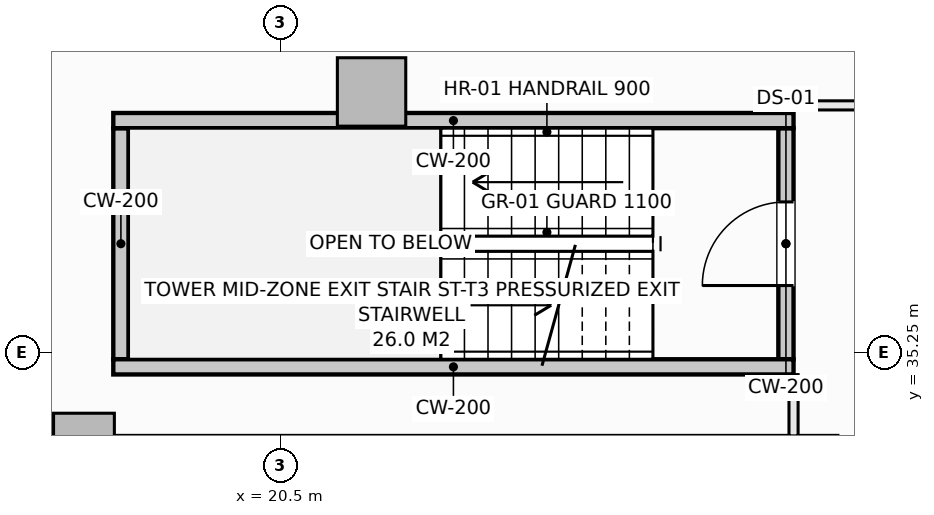
"""IFC4 building model, lengths in metres.
Left out: names, types, materials, properties, quantities, classifications, styles, units other than length and angle.
Written with IfcOpenShell. Run it as: python <this file> out.ifc"""

import sys

from ifc_helpers import new_model, si_unit, direction, frame, frame_2d, origin, origin_2d, place, context, subcontext, project, spatial, rectangle, extrude, element, fill, save


model = new_model("IFC4")
c1 = context("Model", 3, precision=1e-05, world=origin(), true_north=direction((0.0, 1.0)))
c2 = subcontext(c1, "Body", "Model", "MODEL_VIEW")
j1 = project(units=[si_unit("LENGTHUNIT", "METRE"), si_unit("PLANEANGLEUNIT", "RADIAN")], contexts=[c1])
p1 = place(None, origin())
s1 = spatial("IfcSite", under=j1, at=p1, CompositionType="ELEMENT")
p2 = place(p1, origin())
s2 = spatial("IfcBuilding", under=s1, at=p2, CompositionType="ELEMENT")
p3 = place(p2, frame((0.0, 0.0, 105.3)))
s3 = spatial("IfcBuildingStorey", under=s2, at=p3, CompositionType="ELEMENT", Elevation=105.3)
p4 = place(p3, frame((21.698, 38.677, -0.27), z_axis=(0.0, 0.0, 1.0), x_axis=(1.0, 0.0, 0.0)))
e1 = element("IfcColumn", 1, at=p4, inside=s3, PredefinedType="COLUMN", context=c2, shape_type="SweptSolid", body=[
    extrude(rectangle(XDim=0.9, YDim=0.9, at=origin_2d()), origin(), (0.0, 0.0, 1.0), 3.4),
])
p5 = place(p3, frame((17.914, 34.05, -0.27), z_axis=(0.0, 0.0, 1.0), x_axis=(1.0, 0.0, 0.0)))
e2 = element("IfcColumn", 2, at=p5, inside=s3, PredefinedType="PILASTER", context=c2, shape_type="SweptSolid", body=[
    extrude(rectangle(XDim=0.8, YDim=0.8, at=origin_2d()), origin(), (0.0, 0.0, 1.0), 3.4),
])
p6 = place(p3, frame((14.481, 39.223, 0.0), z_axis=(0.0, 0.0, 1.0), x_axis=(0.616435134162, 0.787405693001, 0.0)))
e3 = element("IfcWall", 3, at=p6, inside=s3, PredefinedType="SOLIDWALL", context=c2, shape_type="SweptSolid", body=[
    extrude(rectangle(XDim=5.759, YDim=0.3, at=frame_2d((2.879, 0.0))), origin(), (0.0, 0.0, 1.0), 2.653),
])
p7 = place(p6, frame((1.829, 0.0, 0.74)))
e4 = element("IfcOpeningElement", 4, at=p7, cuts=e3, PredefinedType="OPENING", context=c2, shape_type="SweptSolid", body=[
    extrude(rectangle(XDim=2.1, YDim=1.7, at=frame_2d((1.05, 0.85))), frame((0.0, 0.16, 0.0), z_axis=(0.0, -1.0, 0.0), x_axis=(1.0, 0.0, 0.0)), (0.0, 0.0, 1.0), 0.32),
])
p8 = place(p3, frame((27.15, 35.16, -0.27), z_axis=(0.0, 0.0, 1.0), x_axis=(0.0, 1.0, 0.0)))
e5 = element("IfcWall", 5, at=p8, inside=s3, PredefinedType="SHEAR", context=c2, shape_type="SweptSolid", body=[
    extrude(rectangle(XDim=3.04, YDim=0.2, at=frame_2d((1.52, 0.0))), origin(), (0.0, 0.0, 1.0), 3.4),
])
p9 = place(p8, frame((0.97, 0.0, 0.27)))
e6 = element("IfcOpeningElement", 6, at=p9, cuts=e5, PredefinedType="OPENING", context=c2, shape_type="SweptSolid", body=[
    extrude(rectangle(XDim=1.1, YDim=2.15, at=frame_2d((0.55, 1.075))), frame((0.0, 0.11, 0.0), z_axis=(0.0, -1.0, 0.0), x_axis=(1.0, 0.0, 0.0)), (0.0, 0.0, 1.0), 0.22),
])
p10 = place(p3, frame((18.4, 35.16, -0.27), z_axis=(0.0, 0.0, 1.0), x_axis=(0.0, 1.0, 0.0)))
e7 = element("IfcWall", 7, at=p10, inside=s3, PredefinedType="SHEAR", context=c2, shape_type="SweptSolid", body=[
    extrude(rectangle(XDim=3.04, YDim=0.2, at=frame_2d((1.52, 0.0))), origin(), (0.0, 0.0, 1.0), 3.4),
])
for number, where, z_axis, x_axis in (
    (8, (18.3, 38.3, -0.27), (0.0, 0.0, 1.0), (1.0, 0.0, 0.0)),
    (9, (18.3, 35.06, -0.27), (0.0, 0.0, 1.0), (1.0, 0.0, 0.0)),
):
    element("IfcWall", number, at=place(p3, frame(where, z_axis=z_axis, x_axis=x_axis)), inside=s3, PredefinedType="SHEAR", context=c2, shape_type="SweptSolid", body=[
        extrude(rectangle(XDim=8.95, YDim=0.2, at=frame_2d((4.475, 0.0))), origin(), (0.0, 0.0, 1.0), 3.4),
    ])
p11 = place(p3, frame((27.25, 34.152, 0.0), z_axis=(0.0, 0.0, 1.0), x_axis=(0.0, 1.0, 0.0)))
e10 = element("IfcWall", 10, at=p11, inside=s3, PredefinedType="PARTITIONING", context=c2, shape_type="SweptSolid", body=[
    extrude(rectangle(XDim=0.806, YDim=0.12, at=frame_2d((0.403, 0.0))), origin(), (0.0, 0.0, 1.0), 3.13),
])
p12 = place(p3, frame((27.25, 38.5, 0.0), z_axis=(0.0, 0.0, 1.0), x_axis=(1.0, 0.0, 0.0)))
e11 = element("IfcWall", 11, at=p12, inside=s3, PredefinedType="PARTITIONING", context=c2, shape_type="SweptSolid", body=[
    extrude(rectangle(XDim=2.53, YDim=0.12, at=frame_2d((1.265, 0.0))), origin(), (0.0, 0.0, 1.0), 3.13),
])
p13 = place(p9, origin())
e12 = element("IfcDoor", 12, at=p13, inside=s3, OperationType="SINGLE_SWING_LEFT", PredefinedType="DOOR", context=c2, shape_type="SweptSolid", body=[
    extrude(rectangle(XDim=1.1, YDim=2.15, at=frame_2d((0.55, 1.075))), frame((0.0, 0.025, 0.0), z_axis=(0.0, -1.0, 0.0), x_axis=(1.0, 0.0, 0.0)), (0.0, 0.0, 1.0), 0.05),
])
fill(e6, e12)
save(model, sys.argv[1])
